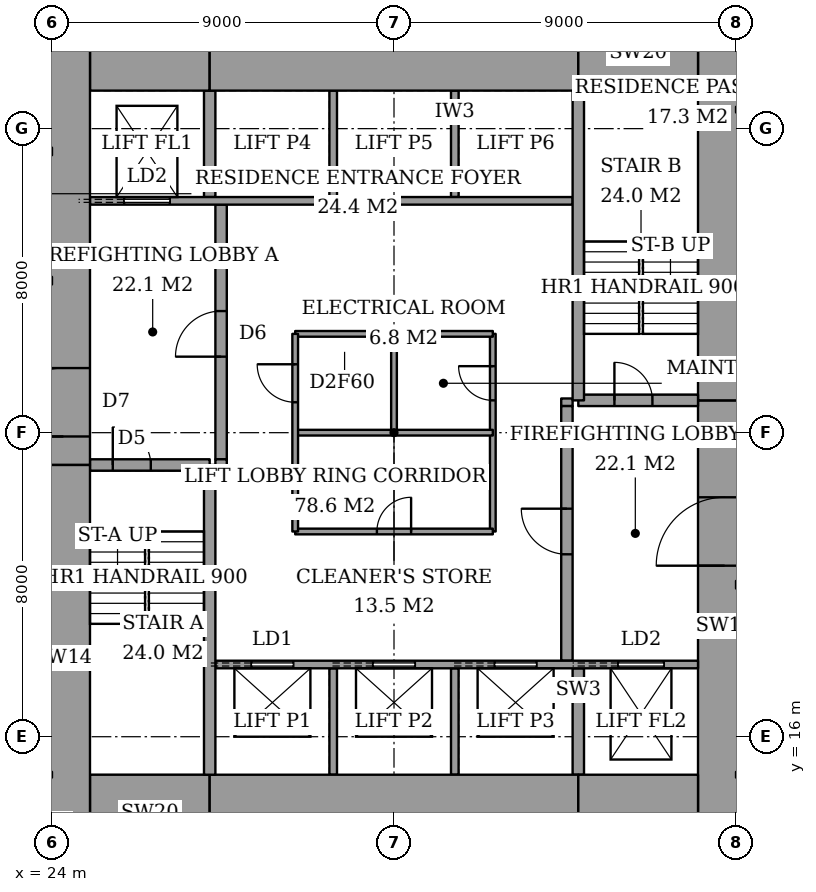
"""IFC4 building model, lengths in metres.
Left out: names, types, materials, properties, quantities, classifications, styles, units other than length and angle.
Written with IfcOpenShell. Run it as: python <this file> out.ifc"""

import sys

from ifc_helpers import new_model, si_unit, direction, frame, frame_2d, origin, place, context, subcontext, project, spatial, rectangle, extrude, element, fill, save


model = new_model("IFC4")
c1 = context("Model", 3, precision=1e-05, world=origin(), true_north=direction((0.0, 1.0)))
c2 = subcontext(c1, "Body", "Model", "MODEL_VIEW")
j1 = project(units=[si_unit("LENGTHUNIT", "METRE"), si_unit("PLANEANGLEUNIT", "RADIAN")], contexts=[c1])
p1 = place(None, origin())
s1 = spatial("IfcSite", under=j1, at=p1, CompositionType="ELEMENT")
p2 = place(p1, origin())
s2 = spatial("IfcBuilding", under=s1, at=p2, CompositionType="ELEMENT")
p3 = place(p2, frame((0.0, 0.0, 76.4)))
s3 = spatial("IfcBuildingStorey", under=s2, at=p3, CompositionType="ELEMENT", Elevation=76.4)
p4 = place(p3, frame((25.0, 14.0, 0.0), z_axis=(0.0, 0.0, 1.0), x_axis=(1.0, 0.0, 0.0)))
e1 = element("IfcWall", 1, at=p4, inside=s3, PredefinedType="SHEAR", context=c2, shape_type="SweptSolid", body=[
    extrude(rectangle(XDim=3.15, YDim=2.0, at=frame_2d((1.575, 0.0))), origin(), (0.0, 0.0, 1.0), 3.6),
])
p5 = place(p3, frame((28.15, 14.0, 0.0), z_axis=(0.0, 0.0, 1.0), x_axis=(1.0, 0.0, 0.0)))
e2 = element("IfcWall", 2, at=p5, inside=s3, PredefinedType="SHEAR", context=c2, shape_type="SweptSolid", body=[
    extrude(rectangle(XDim=9.7, YDim=2.0, at=frame_2d((4.85, 0.0))), origin(), (0.0, 0.0, 1.0), 3.6),
])
for number, where, z_axis, x_axis in (
    (3, (37.85, 14.0, 0.0), (0.0, 0.0, 1.0), (1.0, 0.0, 0.0)),
    (4, (25.0, 34.0, 0.0), (0.0, 0.0, 1.0), (1.0, 0.0, 0.0)),
):
    element("IfcWall", number, at=place(p3, frame(where, z_axis=z_axis, x_axis=x_axis)), inside=s3, PredefinedType="SHEAR", context=c2, shape_type="SweptSolid", body=[
        extrude(rectangle(XDim=3.15, YDim=2.0, at=frame_2d((1.575, 0.0))), origin(), (0.0, 0.0, 1.0), 3.6),
    ])
p6 = place(p3, frame((28.15, 34.0, 0.0), z_axis=(0.0, 0.0, 1.0), x_axis=(1.0, 0.0, 0.0)))
e5 = element("IfcWall", 5, at=p6, inside=s3, PredefinedType="SHEAR", context=c2, shape_type="SweptSolid", body=[
    extrude(rectangle(XDim=9.7, YDim=2.0, at=frame_2d((4.85, 0.0))), origin(), (0.0, 0.0, 1.0), 3.6),
])
p7 = place(p3, frame((37.85, 34.0, 0.0), z_axis=(0.0, 0.0, 1.0), x_axis=(1.0, 0.0, 0.0)))
e6 = element("IfcWall", 6, at=p7, inside=s3, PredefinedType="SHEAR", context=c2, shape_type="SweptSolid", body=[
    extrude(rectangle(XDim=3.15, YDim=2.0, at=frame_2d((1.575, 0.0))), origin(), (0.0, 0.0, 1.0), 3.6),
])
p8 = place(p3, frame((24.3, 13.0, 0.0), z_axis=(0.0, 0.0, 1.0), x_axis=(0.0, 1.0, 0.0)))
e7 = element("IfcWall", 7, at=p8, inside=s3, PredefinedType="SHEAR", context=c2, shape_type="SweptSolid", body=[
    extrude(rectangle(XDim=10.15, YDim=1.4, at=frame_2d((5.075, 0.0))), origin(), (0.0, 0.0, 1.0), 3.6),
])
p9 = place(p3, frame((24.3, 23.15, 0.0), z_axis=(0.0, 0.0, 1.0), x_axis=(0.0, 1.0, 0.0)))
e8 = element("IfcWall", 8, at=p9, inside=s3, PredefinedType="SHEAR", context=c2, shape_type="SweptSolid", body=[
    extrude(rectangle(XDim=11.85, YDim=1.4, at=frame_2d((5.925, 0.0))), origin(), (0.0, 0.0, 1.0), 3.6),
])
p10 = place(p9, frame((0.75, 0.0, 0.0)))
e9 = element("IfcOpeningElement", 9, at=p10, cuts=e8, PredefinedType="OPENING", context=c2, shape_type="SweptSolid", body=[
    extrude(rectangle(XDim=1.8, YDim=2.4, at=frame_2d((0.9, 1.2))), frame((0.0, 0.71, 0.0), z_axis=(0.0, -1.0, 0.0), x_axis=(1.0, 0.0, 0.0)), (0.0, 0.0, 1.0), 1.42),
])
p11 = place(p3, frame((41.7, 13.0, 0.0), z_axis=(0.0, 0.0, 1.0), x_axis=(0.0, 1.0, 0.0)))
e10 = element("IfcWall", 10, at=p11, inside=s3, PredefinedType="SHEAR", context=c2, shape_type="SweptSolid", body=[
    extrude(rectangle(XDim=11.85, YDim=1.4, at=frame_2d((5.925, 0.0))), origin(), (0.0, 0.0, 1.0), 3.6),
])
p12 = place(p11, frame((7.5, 0.0, 0.0)))
e11 = element("IfcOpeningElement", 11, at=p12, cuts=e10, PredefinedType="OPENING", context=c2, shape_type="SweptSolid", body=[
    extrude(rectangle(XDim=1.8, YDim=2.4, at=frame_2d((0.9, 1.2))), frame((0.0, 0.71, 0.0), z_axis=(0.0, -1.0, 0.0), x_axis=(1.0, 0.0, 0.0)), (0.0, 0.0, 1.0), 1.42),
])
p13 = place(p3, frame((41.7, 24.85, 0.0), z_axis=(0.0, 0.0, 1.0), x_axis=(0.0, 1.0, 0.0)))
e12 = element("IfcWall", 12, at=p13, inside=s3, PredefinedType="SHEAR", context=c2, shape_type="SweptSolid", body=[
    extrude(rectangle(XDim=10.15, YDim=1.4, at=frame_2d((5.075, 0.0))), origin(), (0.0, 0.0, 1.0), 3.6),
])
p14 = place(p3, frame((28.15, 15.0, 0.0), z_axis=(0.0, 0.0, 1.0), x_axis=(0.0, 1.0, 0.0)))
e13 = element("IfcWall", 13, at=p14, inside=s3, PredefinedType="SHEAR", context=c2, shape_type="SweptSolid", body=[
    extrude(rectangle(XDim=8.15, YDim=0.3, at=frame_2d((4.075, 0.0))), origin(), (0.0, 0.0, 1.0), 3.6),
])
p15 = place(p3, frame((25.0, 23.15, 0.0), z_axis=(0.0, 0.0, 1.0), x_axis=(1.0, 0.0, 0.0)))
e14 = element("IfcWall", 14, at=p15, inside=s3, PredefinedType="SHEAR", context=c2, shape_type="SweptSolid", body=[
    extrude(rectangle(XDim=3.15, YDim=0.3, at=frame_2d((1.575, 0.0))), origin(), (0.0, 0.0, 1.0), 3.6),
])
p16 = place(p15, frame((0.6, 0.0, 0.0)))
e15 = element("IfcOpeningElement", 15, at=p16, cuts=e14, PredefinedType="OPENING", context=c2, shape_type="SweptSolid", body=[
    extrude(rectangle(XDim=1.0, YDim=2.1, at=frame_2d((0.5, 1.05))), frame((0.0, 0.16, 0.0), z_axis=(0.0, -1.0, 0.0), x_axis=(1.0, 0.0, 0.0)), (0.0, 0.0, 1.0), 0.32),
])
p17 = place(p3, frame((37.85, 24.85, 0.0), z_axis=(0.0, 0.0, 1.0), x_axis=(0.0, 1.0, 0.0)))
e16 = element("IfcWall", 16, at=p17, inside=s3, PredefinedType="SHEAR", context=c2, shape_type="SweptSolid", body=[
    extrude(rectangle(XDim=8.15, YDim=0.3, at=frame_2d((4.075, 0.0))), origin(), (0.0, 0.0, 1.0), 3.6),
])
p18 = place(p3, frame((37.85, 24.85, 0.0), z_axis=(0.0, 0.0, 1.0), x_axis=(1.0, 0.0, 0.0)))
e17 = element("IfcWall", 17, at=p18, inside=s3, PredefinedType="SHEAR", context=c2, shape_type="SweptSolid", body=[
    extrude(rectangle(XDim=3.15, YDim=0.3, at=frame_2d((1.575, 0.0))), origin(), (0.0, 0.0, 1.0), 3.6),
])
p19 = place(p18, frame((0.95, 0.0, 0.0)))
e18 = element("IfcOpeningElement", 18, at=p19, cuts=e17, PredefinedType="OPENING", context=c2, shape_type="SweptSolid", body=[
    extrude(rectangle(XDim=1.0, YDim=2.1, at=frame_2d((0.5, 1.05))), frame((0.0, 0.16, 0.0), z_axis=(0.0, -1.0, 0.0), x_axis=(1.0, 0.0, 0.0)), (0.0, 0.0, 1.0), 0.32),
])
p20 = place(p3, frame((28.45, 23.3, 0.0), z_axis=(0.0, 0.0, 1.0), x_axis=(0.0, 1.0, 0.0)))
e19 = element("IfcWall", 19, at=p20, inside=s3, PredefinedType="PARTITIONING", context=c2, shape_type="SweptSolid", body=[
    extrude(rectangle(XDim=6.7, YDim=0.3, at=frame_2d((3.35, 0.0))), origin(), (0.0, 0.0, 1.0), 3.6),
])
p21 = place(p20, frame((2.7, 0.0, 0.0)))
e20 = element("IfcOpeningElement", 20, at=p21, cuts=e19, PredefinedType="OPENING", context=c2, shape_type="SweptSolid", body=[
    extrude(rectangle(XDim=1.2, YDim=2.1, at=frame_2d((0.6, 1.05))), frame((0.0, 0.16, 0.0), z_axis=(0.0, -1.0, 0.0), x_axis=(1.0, 0.0, 0.0)), (0.0, 0.0, 1.0), 0.32),
])
p22 = place(p3, frame((37.55, 18.0, 0.0), z_axis=(0.0, 0.0, 1.0), x_axis=(0.0, 1.0, 0.0)))
e21 = element("IfcWall", 21, at=p22, inside=s3, PredefinedType="PARTITIONING", context=c2, shape_type="SweptSolid", body=[
    extrude(rectangle(XDim=6.7, YDim=0.3, at=frame_2d((3.35, 0.0))), origin(), (0.0, 0.0, 1.0), 3.6),
])
p23 = place(p22, frame((2.8, 0.0, 0.0)))
e22 = element("IfcOpeningElement", 22, at=p23, cuts=e21, PredefinedType="OPENING", context=c2, shape_type="SweptSolid", body=[
    extrude(rectangle(XDim=1.2, YDim=2.1, at=frame_2d((0.6, 1.05))), frame((0.0, 0.16, 0.0), z_axis=(0.0, -1.0, 0.0), x_axis=(1.0, 0.0, 0.0)), (0.0, 0.0, 1.0), 0.32),
])
p24 = place(p3, frame((28.3, 17.9, 0.0), z_axis=(0.0, 0.0, 1.0), x_axis=(1.0, 0.0, 0.0)))
e23 = element("IfcWall", 23, at=p24, inside=s3, PredefinedType="PARTITIONING", context=c2, shape_type="SweptSolid", body=[
    extrude(rectangle(XDim=12.7, YDim=0.2, at=frame_2d((6.35, 0.0))), origin(), (0.0, 0.0, 1.0), 3.6),
])
p25 = place(p24, frame((0.95, 0.0, 0.0)))
e24 = element("IfcOpeningElement", 24, at=p25, cuts=e23, PredefinedType="OPENING", context=c2, shape_type="SweptSolid", body=[
    extrude(rectangle(XDim=1.1, YDim=2.1, at=frame_2d((0.55, 1.05))), frame((0.0, 0.11, 0.0), z_axis=(0.0, -1.0, 0.0), x_axis=(1.0, 0.0, 0.0)), (0.0, 0.0, 1.0), 0.22),
])
p26 = place(p24, frame((4.15, 0.0, 0.0)))
e25 = element("IfcOpeningElement", 25, at=p26, cuts=e23, PredefinedType="OPENING", context=c2, shape_type="SweptSolid", body=[
    extrude(rectangle(XDim=1.1, YDim=2.1, at=frame_2d((0.55, 1.05))), frame((0.0, 0.11, 0.0), z_axis=(0.0, -1.0, 0.0), x_axis=(1.0, 0.0, 0.0)), (0.0, 0.0, 1.0), 0.22),
])
p27 = place(p24, frame((7.35, 0.0, 0.0)))
e26 = element("IfcOpeningElement", 26, at=p27, cuts=e23, PredefinedType="OPENING", context=c2, shape_type="SweptSolid", body=[
    extrude(rectangle(XDim=1.1, YDim=2.1, at=frame_2d((0.55, 1.05))), frame((0.0, 0.11, 0.0), z_axis=(0.0, -1.0, 0.0), x_axis=(1.0, 0.0, 0.0)), (0.0, 0.0, 1.0), 0.22),
])
p28 = place(p24, frame((10.6, 0.0, 0.0)))
e27 = element("IfcOpeningElement", 27, at=p28, cuts=e23, PredefinedType="OPENING", context=c2, shape_type="SweptSolid", body=[
    extrude(rectangle(XDim=1.2, YDim=2.1, at=frame_2d((0.6, 1.05))), frame((0.0, 0.11, 0.0), z_axis=(0.0, -1.0, 0.0), x_axis=(1.0, 0.0, 0.0)), (0.0, 0.0, 1.0), 0.22),
])
p29 = place(p3, frame((25.0, 30.1, 0.0), z_axis=(0.0, 0.0, 1.0), x_axis=(1.0, 0.0, 0.0)))
e28 = element("IfcWall", 28, at=p29, inside=s3, PredefinedType="PARTITIONING", context=c2, shape_type="SweptSolid", body=[
    extrude(rectangle(XDim=12.7, YDim=0.2, at=frame_2d((6.35, 0.0))), origin(), (0.0, 0.0, 1.0), 3.6),
])
p30 = place(p29, frame((0.9, 0.0, 0.0)))
e29 = element("IfcOpeningElement", 29, at=p30, cuts=e28, PredefinedType="OPENING", context=c2, shape_type="SweptSolid", body=[
    extrude(rectangle(XDim=1.2, YDim=2.1, at=frame_2d((0.6, 1.05))), frame((0.0, 0.11, 0.0), z_axis=(0.0, -1.0, 0.0), x_axis=(1.0, 0.0, 0.0)), (0.0, 0.0, 1.0), 0.22),
])
for number, where, z_axis, x_axis in (
    (30, (31.4, 15.0, 0.0), (0.0, 0.0, 1.0), (0.0, 1.0, 0.0)),
    (31, (34.6, 15.0, 0.0), (0.0, 0.0, 1.0), (0.0, 1.0, 0.0)),
):
    element("IfcWall", number, at=place(p3, frame(where, z_axis=z_axis, x_axis=x_axis)), inside=s3, PredefinedType="PARTITIONING", context=c2, shape_type="SweptSolid", body=[
        extrude(rectangle(XDim=2.8, YDim=0.2, at=frame_2d((1.4, 0.0))), origin(), (0.0, 0.0, 1.0), 3.6),
    ])
p31 = place(p3, frame((37.85, 15.0, 0.0), z_axis=(0.0, 0.0, 1.0), x_axis=(0.0, 1.0, 0.0)))
e32 = element("IfcWall", 32, at=p31, inside=s3, PredefinedType="SHEAR", context=c2, shape_type="SweptSolid", body=[
    extrude(rectangle(XDim=2.8, YDim=0.3, at=frame_2d((1.4, 0.0))), origin(), (0.0, 0.0, 1.0), 3.6),
])
for number, where, z_axis, x_axis in (
    (33, (31.4, 30.2, 0.0), (0.0, 0.0, 1.0), (0.0, 1.0, 0.0)),
    (34, (34.6, 30.2, 0.0), (0.0, 0.0, 1.0), (0.0, 1.0, 0.0)),
):
    element("IfcWall", number, at=place(p3, frame(where, z_axis=z_axis, x_axis=x_axis)), inside=s3, PredefinedType="PARTITIONING", context=c2, shape_type="SweptSolid", body=[
        extrude(rectangle(XDim=2.8, YDim=0.2, at=frame_2d((1.4, 0.0))), origin(), (0.0, 0.0, 1.0), 3.6),
    ])
p32 = place(p3, frame((28.15, 30.2, 0.0), z_axis=(0.0, 0.0, 1.0), x_axis=(0.0, 1.0, 0.0)))
e35 = element("IfcWall", 35, at=p32, inside=s3, PredefinedType="SHEAR", context=c2, shape_type="SweptSolid", body=[
    extrude(rectangle(XDim=2.8, YDim=0.3, at=frame_2d((1.4, 0.0))), origin(), (0.0, 0.0, 1.0), 3.6),
])
for number, where, z_axis, x_axis in (
    (36, (28.3, 23.2, 0.0), (0.0, 0.0, 1.0), (1.0, 0.0, 0.0)),
    (37, (37.4, 24.8, 0.0), (0.0, 0.0, 1.0), (1.0, 0.0, 0.0)),
):
    element("IfcWall", number, at=place(p3, frame(where, z_axis=z_axis, x_axis=x_axis)), inside=s3, PredefinedType="PARTITIONING", context=c2, shape_type="SweptSolid", body=[
        extrude(rectangle(XDim=0.3, YDim=0.2, at=frame_2d((0.15, 0.0))), origin(), (0.0, 0.0, 1.0), 3.6),
    ])
p33 = place(p3, frame((30.4, 21.4, 0.0), z_axis=(0.0, 0.0, 1.0), x_axis=(1.0, 0.0, 0.0)))
e38 = element("IfcWall", 38, at=p33, inside=s3, PredefinedType="PARTITIONING", context=c2, shape_type="SweptSolid", body=[
    extrude(rectangle(XDim=5.2, YDim=0.15, at=frame_2d((2.6, 0.0))), origin(), (0.0, 0.0, 1.0), 3.35),
])
p34 = place(p33, frame((2.15, 0.0, 0.0)))
e39 = element("IfcOpeningElement", 39, at=p34, cuts=e38, PredefinedType="OPENING", context=c2, shape_type="SweptSolid", body=[
    extrude(rectangle(XDim=0.9, YDim=2.1, at=frame_2d((0.45, 1.05))), frame((0.0, 0.085, 0.0), z_axis=(0.0, -1.0, 0.0), x_axis=(1.0, 0.0, 0.0)), (0.0, 0.0, 1.0), 0.17),
])
p35 = place(p3, frame((30.4, 26.6, 0.0), z_axis=(0.0, 0.0, 1.0), x_axis=(1.0, 0.0, 0.0)))
e40 = element("IfcWall", 40, at=p35, inside=s3, PredefinedType="PARTITIONING", context=c2, shape_type="SweptSolid", body=[
    extrude(rectangle(XDim=5.2, YDim=0.15, at=frame_2d((2.6, 0.0))), origin(), (0.0, 0.0, 1.0), 3.35),
])
p36 = place(p3, frame((30.4, 21.4, 0.0), z_axis=(0.0, 0.0, 1.0), x_axis=(0.0, 1.0, 0.0)))
e41 = element("IfcWall", 41, at=p36, inside=s3, PredefinedType="PARTITIONING", context=c2, shape_type="SweptSolid", body=[
    extrude(rectangle(XDim=5.2, YDim=0.15, at=frame_2d((2.6, 0.0))), origin(), (0.0, 0.0, 1.0), 3.35),
])
p37 = place(p36, frame((3.4, 0.0, 0.0)))
e42 = element("IfcOpeningElement", 42, at=p37, cuts=e41, PredefinedType="OPENING", context=c2, shape_type="SweptSolid", body=[
    extrude(rectangle(XDim=1.0, YDim=2.1, at=frame_2d((0.5, 1.05))), frame((0.0, 0.085, 0.0), z_axis=(0.0, -1.0, 0.0), x_axis=(1.0, 0.0, 0.0)), (0.0, 0.0, 1.0), 0.17),
])
p38 = place(p3, frame((35.6, 21.4, 0.0), z_axis=(0.0, 0.0, 1.0), x_axis=(0.0, 1.0, 0.0)))
e43 = element("IfcWall", 43, at=p38, inside=s3, PredefinedType="PARTITIONING", context=c2, shape_type="SweptSolid", body=[
    extrude(rectangle(XDim=5.2, YDim=0.15, at=frame_2d((2.6, 0.0))), origin(), (0.0, 0.0, 1.0), 3.35),
])
p39 = place(p38, frame((3.45, 0.0, 0.0)))
e44 = element("IfcOpeningElement", 44, at=p39, cuts=e43, PredefinedType="OPENING", context=c2, shape_type="SweptSolid", body=[
    extrude(rectangle(XDim=0.9, YDim=2.1, at=frame_2d((0.45, 1.05))), frame((0.0, 0.085, 0.0), z_axis=(0.0, -1.0, 0.0), x_axis=(1.0, 0.0, 0.0)), (0.0, 0.0, 1.0), 0.17),
])
p40 = place(p3, frame((30.4, 24.0, 0.0), z_axis=(0.0, 0.0, 1.0), x_axis=(1.0, 0.0, 0.0)))
e45 = element("IfcWall", 45, at=p40, inside=s3, PredefinedType="PARTITIONING", context=c2, shape_type="SweptSolid", body=[
    extrude(rectangle(XDim=5.2, YDim=0.15, at=frame_2d((2.6, 0.0))), origin(), (0.0, 0.0, 1.0), 3.35),
])
p41 = place(p3, frame((33.0, 24.0, 0.0), z_axis=(0.0, 0.0, 1.0), x_axis=(0.0, 1.0, 0.0)))
e46 = element("IfcWall", 46, at=p41, inside=s3, PredefinedType="PARTITIONING", context=c2, shape_type="SweptSolid", body=[
    extrude(rectangle(XDim=2.6, YDim=0.15, at=frame_2d((1.3, 0.0))), origin(), (0.0, 0.0, 1.0), 3.35),
])
p42 = place(p16, origin())
e47 = element("IfcDoor", 47, at=p42, inside=s3, OperationType="SINGLE_SWING_RIGHT", PredefinedType="DOOR", context=c2, shape_type="SweptSolid", body=[
    extrude(rectangle(XDim=1.0, YDim=2.1, at=frame_2d((0.5, 1.05))), frame((0.0, 0.025, 0.0), z_axis=(0.0, -1.0, 0.0), x_axis=(1.0, 0.0, 0.0)), (0.0, 0.0, 1.0), 0.05),
])
fill(e15, e47)
p43 = place(p19, origin())
e48 = element("IfcDoor", 48, at=p43, inside=s3, OperationType="SINGLE_SWING_RIGHT", PredefinedType="DOOR", context=c2, shape_type="SweptSolid", body=[
    extrude(rectangle(XDim=1.0, YDim=2.1, at=frame_2d((0.5, 1.05))), frame((0.0, 0.025, 0.0), z_axis=(0.0, -1.0, 0.0), x_axis=(1.0, 0.0, 0.0)), (0.0, 0.0, 1.0), 0.05),
])
fill(e18, e48)
p44 = place(p21, origin())
e49 = element("IfcDoor", 49, at=p44, inside=s3, OperationType="SINGLE_SWING_RIGHT", PredefinedType="DOOR", context=c2, shape_type="SweptSolid", body=[
    extrude(rectangle(XDim=1.2, YDim=2.1, at=frame_2d((0.6, 1.05))), frame((0.0, 0.025, 0.0), z_axis=(0.0, -1.0, 0.0), x_axis=(1.0, 0.0, 0.0)), (0.0, 0.0, 1.0), 0.05),
])
fill(e20, e49)
p45 = place(p23, origin())
e50 = element("IfcDoor", 50, at=p45, inside=s3, OperationType="SINGLE_SWING_LEFT", PredefinedType="DOOR", context=c2, shape_type="SweptSolid", body=[
    extrude(rectangle(XDim=1.2, YDim=2.1, at=frame_2d((0.6, 1.05))), frame((0.0, 0.025, 0.0), z_axis=(0.0, -1.0, 0.0), x_axis=(1.0, 0.0, 0.0)), (0.0, 0.0, 1.0), 0.05),
])
fill(e22, e50)
p46 = place(p10, origin())
e51 = element("IfcDoor", 51, at=p46, inside=s3, OperationType="DOUBLE_DOOR_DOUBLE_SWING", PredefinedType="DOOR", context=c2, shape_type="SweptSolid", body=[
    extrude(rectangle(XDim=1.8, YDim=2.4, at=frame_2d((0.9, 1.2))), frame((0.0, 0.025, 0.0), z_axis=(0.0, -1.0, 0.0), x_axis=(1.0, 0.0, 0.0)), (0.0, 0.0, 1.0), 0.05),
])
fill(e9, e51)
p47 = place(p12, origin())
e52 = element("IfcDoor", 52, at=p47, inside=s3, OperationType="DOUBLE_DOOR_DOUBLE_SWING", PredefinedType="DOOR", context=c2, shape_type="SweptSolid", body=[
    extrude(rectangle(XDim=1.8, YDim=2.4, at=frame_2d((0.9, 1.2))), frame((0.0, 0.025, 0.0), z_axis=(0.0, -1.0, 0.0), x_axis=(1.0, 0.0, 0.0)), (0.0, 0.0, 1.0), 0.05),
])
fill(e11, e52)
p48 = place(p34, origin())
e53 = element("IfcDoor", 53, at=p48, inside=s3, OperationType="SINGLE_SWING_LEFT", PredefinedType="DOOR", context=c2, shape_type="SweptSolid", body=[
    extrude(rectangle(XDim=0.9, YDim=2.1, at=frame_2d((0.45, 1.05))), frame((0.0, 0.025, 0.0), z_axis=(0.0, -1.0, 0.0), x_axis=(1.0, 0.0, 0.0)), (0.0, 0.0, 1.0), 0.05),
])
fill(e39, e53)
p49 = place(p37, origin())
e54 = element("IfcDoor", 54, at=p49, inside=s3, OperationType="SINGLE_SWING_LEFT", PredefinedType="DOOR", context=c2, shape_type="SweptSolid", body=[
    extrude(rectangle(XDim=1.0, YDim=2.1, at=frame_2d((0.5, 1.05))), frame((0.0, 0.025, 0.0), z_axis=(0.0, -1.0, 0.0), x_axis=(1.0, 0.0, 0.0)), (0.0, 0.0, 1.0), 0.05),
])
fill(e42, e54)
p50 = place(p39, origin())
e55 = element("IfcDoor", 55, at=p50, inside=s3, OperationType="SINGLE_SWING_LEFT", PredefinedType="DOOR", context=c2, shape_type="SweptSolid", body=[
    extrude(rectangle(XDim=0.9, YDim=2.1, at=frame_2d((0.45, 1.05))), frame((0.0, 0.025, 0.0), z_axis=(0.0, -1.0, 0.0), x_axis=(1.0, 0.0, 0.0)), (0.0, 0.0, 1.0), 0.05),
])
fill(e44, e55)
p51 = place(p25, origin())
e56 = element("IfcDoor", 56, at=p51, inside=s3, OperationType="SLIDING_TO_LEFT", PredefinedType="DOOR", context=c2, shape_type="SweptSolid", body=[
    extrude(rectangle(XDim=1.1, YDim=2.1, at=frame_2d((0.55, 1.05))), frame((0.0, 0.025, 0.0), z_axis=(0.0, -1.0, 0.0), x_axis=(1.0, 0.0, 0.0)), (0.0, 0.0, 1.0), 0.05),
])
fill(e24, e56)
p52 = place(p26, origin())
e57 = element("IfcDoor", 57, at=p52, inside=s3, OperationType="SLIDING_TO_LEFT", PredefinedType="DOOR", context=c2, shape_type="SweptSolid", body=[
    extrude(rectangle(XDim=1.1, YDim=2.1, at=frame_2d((0.55, 1.05))), frame((0.0, 0.025, 0.0), z_axis=(0.0, -1.0, 0.0), x_axis=(1.0, 0.0, 0.0)), (0.0, 0.0, 1.0), 0.05),
])
fill(e25, e57)
p53 = place(p27, origin())
e58 = element("IfcDoor", 58, at=p53, inside=s3, OperationType="SLIDING_TO_LEFT", PredefinedType="DOOR", context=c2, shape_type="SweptSolid", body=[
    extrude(rectangle(XDim=1.1, YDim=2.1, at=frame_2d((0.55, 1.05))), frame((0.0, 0.025, 0.0), z_axis=(0.0, -1.0, 0.0), x_axis=(1.0, 0.0, 0.0)), (0.0, 0.0, 1.0), 0.05),
])
fill(e26, e58)
p54 = place(p30, origin())
e59 = element("IfcDoor", 59, at=p54, inside=s3, OperationType="SLIDING_TO_LEFT", PredefinedType="DOOR", context=c2, shape_type="SweptSolid", body=[
    extrude(rectangle(XDim=1.2, YDim=2.1, at=frame_2d((0.6, 1.05))), frame((0.0, 0.025, 0.0), z_axis=(0.0, -1.0, 0.0), x_axis=(1.0, 0.0, 0.0)), (0.0, 0.0, 1.0), 0.05),
])
fill(e29, e59)
p55 = place(p28, origin())
e60 = element("IfcDoor", 60, at=p55, inside=s3, OperationType="SLIDING_TO_LEFT", PredefinedType="DOOR", context=c2, shape_type="SweptSolid", body=[
    extrude(rectangle(XDim=1.2, YDim=2.1, at=frame_2d((0.6, 1.05))), frame((0.0, 0.025, 0.0), z_axis=(0.0, -1.0, 0.0), x_axis=(1.0, 0.0, 0.0)), (0.0, 0.0, 1.0), 0.05),
])
fill(e27, e60)
save(model, sys.argv[1])
